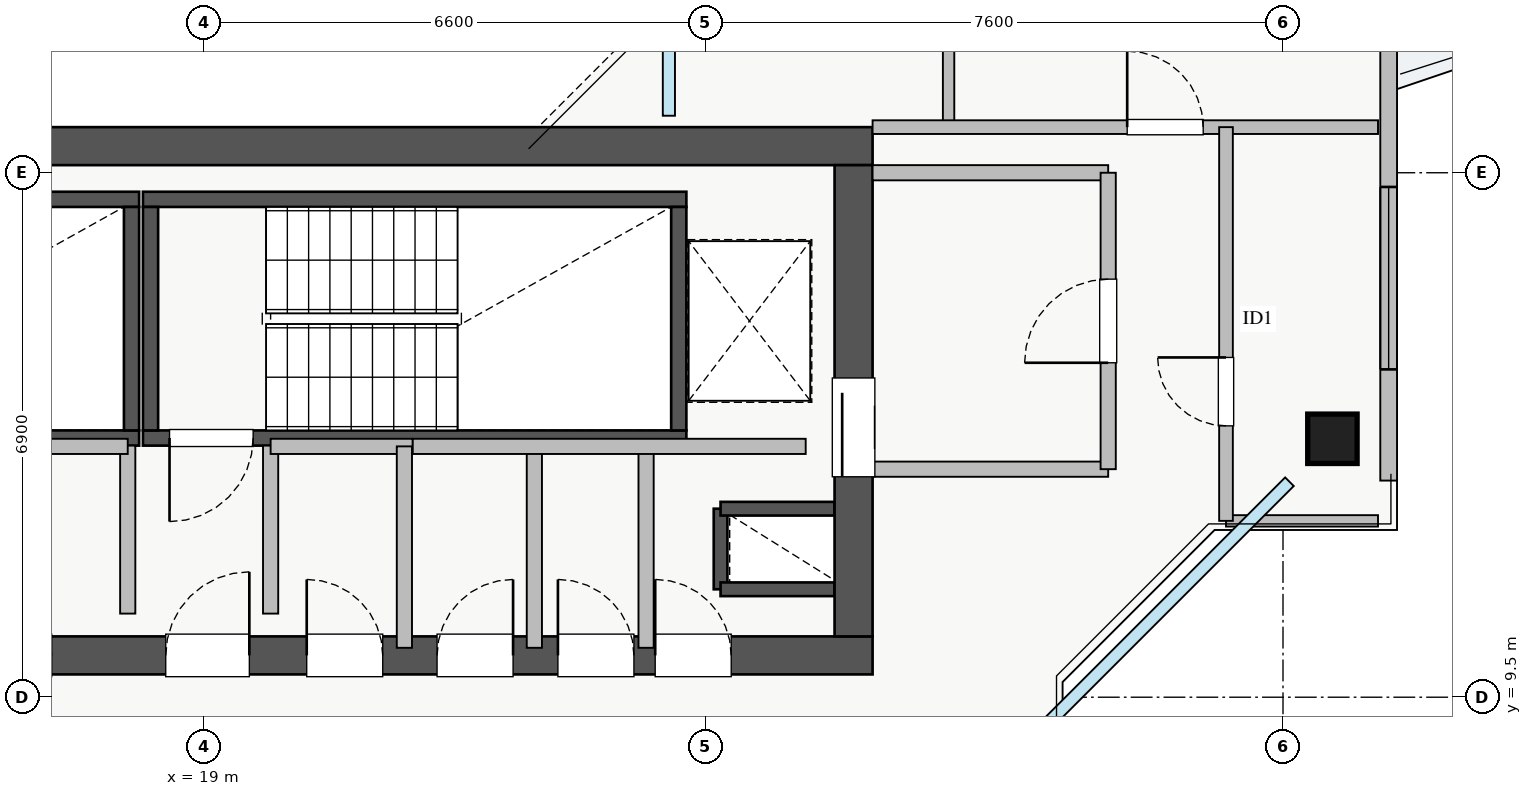
"""IFC4 building model, lengths in metres.
Left out: names, types, materials, properties, quantities, classifications, styles, units other than length and angle.
Written with IfcOpenShell. Run it as: python <this file> out.ifc"""

import sys

from ifc_helpers import new_model, si_unit, direction, frame, frame_2d, origin, origin_2d, place, context, subcontext, project, spatial, rectangle, extrude, source, transform, mapped, element, fill, save


model = new_model("IFC4")
c1 = context("Model", 3, precision=1e-05, world=origin(), true_north=direction((0.0, 1.0)))
c2 = subcontext(c1, "Body", "Model", "MODEL_VIEW")
j1 = project(units=[si_unit("LENGTHUNIT", "METRE"), si_unit("PLANEANGLEUNIT", "RADIAN")], contexts=[c1])
p1 = place(None, origin())
s1 = spatial("IfcSite", under=j1, at=p1, CompositionType="ELEMENT")
p2 = place(p1, origin())
s2 = spatial("IfcBuilding", under=s1, at=p2, CompositionType="ELEMENT")
p3 = place(p2, frame((0.0, 0.0, 243.75)))
s3 = spatial("IfcBuildingStorey", under=s2, at=p3, CompositionType="ELEMENT", Elevation=243.75)
p4 = place(p3, frame((25.8, 10.92, 0.0), z_axis=(0.0, 0.0, 1.0), x_axis=(0.0, 1.0, 0.0)))
e1 = element("IfcWall", 1, at=p4, inside=s3, PredefinedType="SHEAR", context=c2, shape_type="SweptSolid", body=[
    extrude(rectangle(XDim=1.06, YDim=0.18, at=frame_2d((0.53, 0.0))), origin(), (0.0, 0.0, 1.0), 3.07),
])
for number, where, z_axis, x_axis in (
    (2, (25.8, 11.98, 0.0), (0.0, 0.0, 1.0), (1.0, 0.0, 0.0)),
    (3, (25.8, 10.92, 0.0), (0.0, 0.0, 1.0), (1.0, 0.0, 0.0)),
):
    element("IfcWall", number, at=place(p3, frame(where, z_axis=z_axis, x_axis=x_axis)), inside=s3, PredefinedType="SHEAR", context=c2, shape_type="SweptSolid", body=[
        extrude(rectangle(XDim=1.5, YDim=0.18, at=frame_2d((0.75, 0.0))), origin(), (0.0, 0.0, 1.0), 3.07),
    ])
p5 = place(p3, frame((10.7, 12.91, 0.0), z_axis=(0.0, 0.0, 1.0), x_axis=(1.0, 0.0, 0.0)))
e4 = element("IfcWall", 4, at=p5, inside=s3, PredefinedType="SHEAR", context=c2, shape_type="SweptSolid", body=[
    extrude(rectangle(XDim=7.45, YDim=0.2, at=frame_2d((3.725, 0.0))), origin(), (0.0, 0.0, 1.0), 3.25),
])
p6 = place(p5, frame((0.35, 0.0, 0.0)))
e5 = element("IfcOpeningElement", 5, at=p6, cuts=e4, PredefinedType="OPENING", context=c2, shape_type="SweptSolid", body=[
    extrude(rectangle(XDim=1.1, YDim=2.05, at=frame_2d((0.55, 1.025))), frame((0.0, 0.11, 0.0), z_axis=(0.0, -1.0, 0.0), x_axis=(1.0, 0.0, 0.0)), (0.0, 0.0, 1.0), 0.22),
])
p7 = place(p3, frame((10.7, 16.05, 0.0), z_axis=(0.0, 0.0, 1.0), x_axis=(1.0, 0.0, 0.0)))
e6 = element("IfcWall", 6, at=p7, inside=s3, PredefinedType="SHEAR", context=c2, shape_type="SweptSolid", body=[
    extrude(rectangle(XDim=7.45, YDim=0.2, at=frame_2d((3.725, 0.0))), origin(), (0.0, 0.0, 1.0), 3.25),
])
p8 = place(p3, frame((18.05, 13.01, 0.0), z_axis=(0.0, 0.0, 1.0), x_axis=(0.0, 1.0, 0.0)))
e7 = element("IfcWall", 7, at=p8, inside=s3, PredefinedType="SHEAR", context=c2, shape_type="SweptSolid", body=[
    extrude(rectangle(XDim=2.94, YDim=0.2, at=frame_2d((1.47, 0.0))), origin(), (0.0, 0.0, 1.0), 3.25),
])
p9 = place(p3, frame((18.2, 12.91, 0.0), z_axis=(0.0, 0.0, 1.0), x_axis=(1.0, 0.0, 0.0)))
e8 = element("IfcWall", 8, at=p9, inside=s3, PredefinedType="SHEAR", context=c2, shape_type="SweptSolid", body=[
    extrude(rectangle(XDim=7.15, YDim=0.2, at=frame_2d((3.575, 0.0))), origin(), (0.0, 0.0, 1.0), 3.25),
])
p10 = place(p9, frame((0.35, 0.0, 0.0)))
e9 = element("IfcOpeningElement", 9, at=p10, cuts=e8, PredefinedType="OPENING", context=c2, shape_type="SweptSolid", body=[
    extrude(rectangle(XDim=1.1, YDim=2.05, at=frame_2d((0.55, 1.025))), frame((0.0, 0.11, 0.0), z_axis=(0.0, -1.0, 0.0), x_axis=(1.0, 0.0, 0.0)), (0.0, 0.0, 1.0), 0.22),
])
p11 = place(p3, frame((18.2, 16.05, 0.0), z_axis=(0.0, 0.0, 1.0), x_axis=(1.0, 0.0, 0.0)))
e10 = element("IfcWall", 10, at=p11, inside=s3, PredefinedType="SHEAR", context=c2, shape_type="SweptSolid", body=[
    extrude(rectangle(XDim=7.15, YDim=0.2, at=frame_2d((3.575, 0.0))), origin(), (0.0, 0.0, 1.0), 3.25),
])
for number, where, z_axis, x_axis in (
    (11, (18.3, 13.01, 0.0), (0.0, 0.0, 1.0), (0.0, 1.0, 0.0)),
    (12, (25.25, 13.01, 0.0), (0.0, 0.0, 1.0), (0.0, 1.0, 0.0)),
):
    element("IfcWall", number, at=place(p3, frame(where, z_axis=z_axis, x_axis=x_axis)), inside=s3, PredefinedType="SHEAR", context=c2, shape_type="SweptSolid", body=[
        extrude(rectangle(XDim=2.94, YDim=0.2, at=frame_2d((1.47, 0.0))), origin(), (0.0, 0.0, 1.0), 3.25),
    ])
p12 = place(p3, frame((10.2, 10.05, 0.0), z_axis=(0.0, 0.0, 1.0), x_axis=(1.0, 0.0, 0.0)))
e13 = element("IfcWall", 13, at=p12, inside=s3, PredefinedType="SHEAR", context=c2, shape_type="SweptSolid", body=[
    extrude(rectangle(XDim=17.6, YDim=0.5, at=frame_2d((8.8, 0.0))), origin(), (0.0, 0.0, 1.0), 3.25),
])
p13 = place(p12, frame((1.15, 0.0, 0.0)))
e14 = element("IfcOpeningElement", 14, at=p13, cuts=e13, PredefinedType="OPENING", context=c2, shape_type="SweptSolid", body=[
    extrude(rectangle(XDim=1.1, YDim=2.05, at=frame_2d((0.55, 1.025))), frame((0.0, 0.26, 0.0), z_axis=(0.0, -1.0, 0.0), x_axis=(1.0, 0.0, 0.0)), (0.0, 0.0, 1.0), 0.52),
])
p14 = place(p12, frame((8.3, 0.0, 0.0)))
e15 = element("IfcOpeningElement", 15, at=p14, cuts=e13, PredefinedType="OPENING", context=c2, shape_type="SweptSolid", body=[
    extrude(rectangle(XDim=1.1, YDim=2.05, at=frame_2d((0.55, 1.025))), frame((0.0, 0.26, 0.0), z_axis=(0.0, -1.0, 0.0), x_axis=(1.0, 0.0, 0.0)), (0.0, 0.0, 1.0), 0.52),
])
p15 = place(p12, frame((2.85, 0.0, 0.0)))
e16 = element("IfcOpeningElement", 16, at=p15, cuts=e13, PredefinedType="OPENING", context=c2, shape_type="SweptSolid", body=[
    extrude(rectangle(XDim=1.1, YDim=2.05, at=frame_2d((0.55, 1.025))), frame((0.0, 0.26, 0.0), z_axis=(0.0, -1.0, 0.0), x_axis=(1.0, 0.0, 0.0)), (0.0, 0.0, 1.0), 0.52),
])
p16 = place(p12, frame((5.8, 0.0, 0.0)))
e17 = element("IfcOpeningElement", 17, at=p16, cuts=e13, PredefinedType="OPENING", context=c2, shape_type="SweptSolid", body=[
    extrude(rectangle(XDim=1.0, YDim=2.05, at=frame_2d((0.5, 1.025))), frame((0.0, 0.26, 0.0), z_axis=(0.0, -1.0, 0.0), x_axis=(1.0, 0.0, 0.0)), (0.0, 0.0, 1.0), 0.52),
])
p17 = place(p12, frame((14.74, 0.0, 0.0)))
e18 = element("IfcOpeningElement", 18, at=p17, cuts=e13, PredefinedType="OPENING", context=c2, shape_type="SweptSolid", body=[
    extrude(rectangle(XDim=1.0, YDim=2.05, at=frame_2d((0.5, 1.025))), frame((0.0, 0.26, 0.0), z_axis=(0.0, -1.0, 0.0), x_axis=(1.0, 0.0, 0.0)), (0.0, 0.0, 1.0), 0.52),
])
p18 = place(p12, frame((10.155, 0.0, 0.0)))
e19 = element("IfcOpeningElement", 19, at=p18, cuts=e13, PredefinedType="OPENING", context=c2, shape_type="SweptSolid", body=[
    extrude(rectangle(XDim=1.0, YDim=2.05, at=frame_2d((0.5, 1.025))), frame((0.0, 0.26, 0.0), z_axis=(0.0, -1.0, 0.0), x_axis=(1.0, 0.0, 0.0)), (0.0, 0.0, 1.0), 0.52),
])
p19 = place(p12, frame((11.87, 0.0, 0.0)))
e20 = element("IfcOpeningElement", 20, at=p19, cuts=e13, PredefinedType="OPENING", context=c2, shape_type="SweptSolid", body=[
    extrude(rectangle(XDim=1.0, YDim=2.05, at=frame_2d((0.5, 1.025))), frame((0.0, 0.26, 0.0), z_axis=(0.0, -1.0, 0.0), x_axis=(1.0, 0.0, 0.0)), (0.0, 0.0, 1.0), 0.52),
])
p20 = place(p12, frame((13.46, 0.0, 0.0)))
e21 = element("IfcOpeningElement", 21, at=p20, cuts=e13, PredefinedType="OPENING", context=c2, shape_type="SweptSolid", body=[
    extrude(rectangle(XDim=1.0, YDim=2.05, at=frame_2d((0.5, 1.025))), frame((0.0, 0.26, 0.0), z_axis=(0.0, -1.0, 0.0), x_axis=(1.0, 0.0, 0.0)), (0.0, 0.0, 1.0), 0.52),
])
p21 = place(p3, frame((10.2, 16.75, 0.0), z_axis=(0.0, 0.0, 1.0), x_axis=(1.0, 0.0, 0.0)))
e22 = element("IfcWall", 22, at=p21, inside=s3, PredefinedType="SHEAR", context=c2, shape_type="SweptSolid", body=[
    extrude(rectangle(XDim=17.6, YDim=0.5, at=frame_2d((8.8, 0.0))), origin(), (0.0, 0.0, 1.0), 3.25),
])
p22 = place(p3, frame((27.55, 10.3, 0.0), z_axis=(0.0, 0.0, 1.0), x_axis=(0.0, 1.0, 0.0)))
e23 = element("IfcWall", 23, at=p22, inside=s3, PredefinedType="SHEAR", context=c2, shape_type="SweptSolid", body=[
    extrude(rectangle(XDim=6.2, YDim=0.5, at=frame_2d((3.1, 0.0))), origin(), (0.0, 0.0, 1.0), 3.25),
])
p23 = place(p22, frame((2.1, 0.0, 0.0)))
e24 = element("IfcOpeningElement", 24, at=p23, cuts=e23, PredefinedType="OPENING", context=c2, shape_type="SweptSolid", body=[
    extrude(rectangle(XDim=1.3, YDim=2.05, at=frame_2d((0.65, 1.025))), frame((0.0, 0.26, 0.0), z_axis=(0.0, -1.0, 0.0), x_axis=(1.0, 0.0, 0.0)), (0.0, 0.0, 1.0), 0.52),
])
m1 = source(origin(), c2, "Body", "SweptSolid", [
    extrude(rectangle(XDim=0.65, YDim=0.65, at=origin_2d()), origin(), (0.0, 0.0, 1.0), 3.25),
])
p24 = place(p3, frame((33.85, 12.9, 0.0), z_axis=(0.0, 0.0, 1.0), x_axis=(1.0, 0.0, 0.0)))
e25 = element("IfcColumn", 25, at=p24, inside=s3, PredefinedType="COLUMN", context=c2, shape_type="MappedRepresentation", body=[
    mapped(m1, transform((0.0, 0.0, 0.0), x_axis=(1.0, 0.0, 0.0), y_axis=(0.0, 1.0, 0.0), z_axis=(0.0, 0.0, 1.0), scale=1.0)),
])
p25 = place(p3, frame((34.59, 12.35, 0.0), z_axis=(0.0, 0.0, 1.0), x_axis=(0.0, 1.0, 0.0)))
e26 = element("IfcWall", 26, at=p25, inside=s3, PredefinedType="STANDARD", context=c2, shape_type="SweptSolid", body=[
    extrude(rectangle(XDim=21.3, YDim=0.22, at=frame_2d((10.65, 0.0))), origin(), (0.0, 0.0, 1.0), 2.61),
])
p26 = place(p25, frame((11.5, 0.0, 0.0)))
e27 = element("IfcOpeningElement", 27, at=p26, cuts=e26, PredefinedType="OPENING", context=c2, shape_type="SweptSolid", body=[
    extrude(rectangle(XDim=1.2, YDim=2.1, at=frame_2d((0.6, 1.05))), frame((0.0, 0.12, 0.0), z_axis=(0.0, -1.0, 0.0), x_axis=(1.0, 0.0, 0.0)), (0.0, 0.0, 1.0), 0.24),
])
p27 = place(p25, frame((1.463, 0.0, 0.9)))
e28 = element("IfcOpeningElement", 28, at=p27, cuts=e26, PredefinedType="OPENING", context=c2, shape_type="SweptSolid", body=[
    extrude(rectangle(XDim=2.4, YDim=1.48, at=frame_2d((1.2, 0.74))), frame((0.0, 0.12, 0.0), z_axis=(0.0, -1.0, 0.0), x_axis=(1.0, 0.0, 0.0)), (0.0, 0.0, 1.0), 0.24),
])
p28 = place(p25, frame((17.588, 0.0, 0.9)))
e29 = element("IfcOpeningElement", 29, at=p28, cuts=e26, PredefinedType="OPENING", context=c2, shape_type="SweptSolid", body=[
    extrude(rectangle(XDim=2.1, YDim=1.48, at=frame_2d((1.05, 0.74))), frame((0.0, 0.12, 0.0), z_axis=(0.0, -1.0, 0.0), x_axis=(1.0, 0.0, 0.0)), (0.0, 0.0, 1.0), 0.24),
])
for number, where, z_axis, x_axis in (
    (30, (27.8, 16.4, 0.0), (0.0, 0.0, 1.0), (1.0, 0.0, 0.0)),
    (31, (27.8, 12.5, 0.0), (0.0, 0.0, 1.0), (1.0, 0.0, 0.0)),
):
    element("IfcWall", number, at=place(p3, frame(where, z_axis=z_axis, x_axis=x_axis)), inside=s3, PredefinedType="PARTITIONING", context=c2, shape_type="SweptSolid", body=[
        extrude(rectangle(XDim=3.1, YDim=0.2, at=frame_2d((1.55, 0.0))), origin(), (0.0, 0.0, 1.0), 3.07),
    ])
p29 = place(p3, frame((30.9, 12.5, 0.0), z_axis=(0.0, 0.0, 1.0), x_axis=(0.0, 1.0, 0.0)))
e32 = element("IfcWall", 32, at=p29, inside=s3, PredefinedType="PARTITIONING", context=c2, shape_type="SweptSolid", body=[
    extrude(rectangle(XDim=3.9, YDim=0.2, at=frame_2d((1.95, 0.0))), origin(), (0.0, 0.0, 1.0), 2.865),
])
p30 = place(p29, frame((1.4, 0.0, 0.0)))
e33 = element("IfcOpeningElement", 33, at=p30, cuts=e32, PredefinedType="OPENING", context=c2, shape_type="SweptSolid", body=[
    extrude(rectangle(XDim=1.1, YDim=2.05, at=frame_2d((0.55, 1.025))), frame((0.0, 0.11, 0.0), z_axis=(0.0, -1.0, 0.0), x_axis=(1.0, 0.0, 0.0)), (0.0, 0.0, 1.0), 0.22),
])
for number, where, z_axis, x_axis in (
    (34, (18.0, 10.6, 0.0), (0.0, 0.0, 1.0), (0.0, 1.0, 0.0)),
    (35, (19.88, 10.6, 0.0), (0.0, 0.0, 1.0), (0.0, 1.0, 0.0)),
):
    element("IfcWall", number, at=place(p3, frame(where, z_axis=z_axis, x_axis=x_axis)), inside=s3, PredefinedType="PARTITIONING", context=c2, shape_type="SweptSolid", body=[
        extrude(rectangle(XDim=2.21, YDim=0.2, at=frame_2d((1.105, 0.0))), origin(), (0.0, 0.0, 1.0), 3.07),
    ])
p31 = place(p3, frame((14.72, 12.8, 0.0), z_axis=(0.0, 0.0, 1.0), x_axis=(1.0, 0.0, 0.0)))
e36 = element("IfcWall", 36, at=p31, inside=s3, PredefinedType="PARTITIONING", context=c2, shape_type="SweptSolid", body=[
    extrude(rectangle(XDim=3.28, YDim=0.2, at=frame_2d((1.64, 0.0))), origin(), (0.0, 0.0, 1.0), 3.07),
])
p32 = place(p3, frame((24.82, 10.15, 0.0), z_axis=(0.0, 0.0, 1.0), x_axis=(0.0, 1.0, 0.0)))
e37 = element("IfcWall", 37, at=p32, inside=s3, PredefinedType="PARTITIONING", context=c2, shape_type="SweptSolid", body=[
    extrude(rectangle(XDim=2.65, YDim=0.2, at=frame_2d((1.325, 0.0))), origin(), (0.0, 0.0, 1.0), 3.07),
])
p33 = place(p3, frame((19.88, 12.8, 0.0), z_axis=(0.0, 0.0, 1.0), x_axis=(1.0, 0.0, 0.0)))
e38 = element("IfcWall", 38, at=p33, inside=s3, PredefinedType="PARTITIONING", context=c2, shape_type="SweptSolid", body=[
    extrude(rectangle(XDim=1.87, YDim=0.2, at=frame_2d((0.935, 0.0))), origin(), (0.0, 0.0, 1.0), 3.07),
])
for number, where, z_axis, x_axis in (
    (39, (21.64, 10.15, 0.0), (0.0, 0.0, 1.0), (0.0, 1.0, 0.0)),
    (40, (23.35, 10.15, 0.0), (0.0, 0.0, 1.0), (0.0, 1.0, 0.0)),
):
    element("IfcWall", number, at=place(p3, frame(where, z_axis=z_axis, x_axis=x_axis)), inside=s3, PredefinedType="PARTITIONING", context=c2, shape_type="SweptSolid", body=[
        extrude(rectangle(XDim=2.65, YDim=0.2, at=frame_2d((1.325, 0.0))), origin(), (0.0, 0.0, 1.0), 3.07),
    ])
p34 = place(p3, frame((21.75, 12.8, 0.0), z_axis=(0.0, 0.0, 1.0), x_axis=(1.0, 0.0, 0.0)))
e41 = element("IfcWall", 41, at=p34, inside=s3, PredefinedType="PARTITIONING", context=c2, shape_type="SweptSolid", body=[
    extrude(rectangle(XDim=5.17, YDim=0.2, at=frame_2d((2.585, 0.0))), origin(), (0.0, 0.0, 1.0), 3.07),
])
p35 = place(p3, frame((28.8, 17.0, 0.0), z_axis=(0.0, 0.0, 1.0), x_axis=(0.0, 1.0, 0.0)))
e42 = element("IfcWall", 42, at=p35, inside=s3, PredefinedType="PARTITIONING", context=c2, shape_type="SweptSolid", body=[
    extrude(rectangle(XDim=6.0, YDim=0.15, at=frame_2d((3.0, 0.0))), origin(), (0.0, 0.0, 1.0), 3.07),
])
p36 = place(p35, frame((2.2, 0.0, 0.0)))
e43 = element("IfcOpeningElement", 43, at=p36, cuts=e42, PredefinedType="OPENING", context=c2, shape_type="SweptSolid", body=[
    extrude(rectangle(XDim=0.9, YDim=2.05, at=frame_2d((0.45, 1.025))), frame((0.0, 0.085, 0.0), z_axis=(0.0, -1.0, 0.0), x_axis=(1.0, 0.0, 0.0)), (0.0, 0.0, 1.0), 0.17),
])
p37 = place(p3, frame((27.8, 17.0, 0.0), z_axis=(0.0, 0.0, 1.0), x_axis=(1.0, 0.0, 0.0)))
e44 = element("IfcWall", 44, at=p37, inside=s3, PredefinedType="PARTITIONING", context=c2, shape_type="SweptSolid", body=[
    extrude(rectangle(XDim=6.65, YDim=0.18, at=frame_2d((3.325, 0.0))), origin(), (0.0, 0.0, 1.0), 3.07),
])
p38 = place(p37, frame((3.35, 0.0, 0.0)))
e45 = element("IfcOpeningElement", 45, at=p38, cuts=e44, PredefinedType="OPENING", context=c2, shape_type="SweptSolid", body=[
    extrude(rectangle(XDim=1.0, YDim=2.05, at=frame_2d((0.5, 1.025))), frame((0.0, 0.1, 0.0), z_axis=(0.0, -1.0, 0.0), x_axis=(1.0, 0.0, 0.0)), (0.0, 0.0, 1.0), 0.2),
])
p39 = place(p3, frame((32.45, 11.82, 0.0), z_axis=(0.0, 0.0, 1.0), x_axis=(1.0, 0.0, 0.0)))
e46 = element("IfcWall", 46, at=p39, inside=s3, PredefinedType="PARTITIONING", context=c2, shape_type="SweptSolid", body=[
    extrude(rectangle(XDim=2.0, YDim=0.15, at=frame_2d((1.0, 0.0))), origin(), (0.0, 0.0, 1.0), 3.07),
])
p40 = place(p3, frame((32.45, 11.82, 0.0), z_axis=(0.0, 0.0, 1.0), x_axis=(0.0, 1.0, 0.0)))
e47 = element("IfcWall", 47, at=p40, inside=s3, PredefinedType="PARTITIONING", context=c2, shape_type="SweptSolid", body=[
    extrude(rectangle(XDim=5.18, YDim=0.18, at=frame_2d((2.59, 0.0))), origin(), (0.0, 0.0, 1.0), 3.07),
])
p41 = place(p40, frame((1.25, 0.0, 0.0)))
e48 = element("IfcOpeningElement", 48, at=p41, cuts=e47, PredefinedType="OPENING", context=c2, shape_type="SweptSolid", body=[
    extrude(rectangle(XDim=0.9, YDim=2.05, at=frame_2d((0.45, 1.025))), frame((0.0, 0.1, 0.0), z_axis=(0.0, -1.0, 0.0), x_axis=(1.0, 0.0, 0.0)), (0.0, 0.0, 1.0), 0.2),
])
m2 = source(origin(), c2, "Body", "SweptSolid", [
    extrude(rectangle(XDim=2.4, YDim=1.48, at=frame_2d((1.2, 0.74))), frame((0.0, 0.03, 0.0), z_axis=(0.0, -1.0, 0.0), x_axis=(1.0, 0.0, 0.0)), (0.0, 0.0, 1.0), 0.06),
])
p42 = place(p27, origin())
e49 = element("IfcWindow", 49, at=p42, inside=s3, PartitioningType="TRIPLE_PANEL_VERTICAL", PredefinedType="WINDOW", context=c2, shape_type="MappedRepresentation", body=[
    mapped(m2, transform((0.0, 0.0, 0.0), x_axis=(1.0, 0.0, 0.0), y_axis=(0.0, 1.0, 0.0), z_axis=(0.0, 0.0, 1.0), scale=1.0)),
])
fill(e28, e49)
m3 = source(origin(), c2, "Body", "SweptSolid", [
    extrude(rectangle(XDim=1.3, YDim=2.05, at=frame_2d((0.65, 1.025))), frame((0.0, 0.025, 0.0), z_axis=(0.0, -1.0, 0.0), x_axis=(1.0, 0.0, 0.0)), (0.0, 0.0, 1.0), 0.05),
])
p43 = place(p23, origin())
e50 = element("IfcDoor", 50, at=p43, inside=s3, OperationType="SLIDING_TO_RIGHT", PredefinedType="DOOR", context=c2, shape_type="MappedRepresentation", body=[
    mapped(m3, transform((0.0, 0.0, 0.0), x_axis=(1.0, 0.0, 0.0), y_axis=(0.0, 1.0, 0.0), z_axis=(0.0, 0.0, 1.0), scale=1.0)),
])
fill(e24, e50)
m4 = source(origin(), c2, "Body", "SweptSolid", [
    extrude(rectangle(XDim=1.1, YDim=2.05, at=frame_2d((0.55, 1.025))), frame((0.0, 0.025, 0.0), z_axis=(0.0, -1.0, 0.0), x_axis=(1.0, 0.0, 0.0)), (0.0, 0.0, 1.0), 0.05),
])
p44 = place(p14, origin())
e51 = element("IfcDoor", 51, at=p44, inside=s3, OperationType="SINGLE_SWING_RIGHT", PredefinedType="DOOR", context=c2, shape_type="MappedRepresentation", body=[
    mapped(m4, transform((0.0, 0.0, 0.0), x_axis=(1.0, 0.0, 0.0), y_axis=(0.0, 1.0, 0.0), z_axis=(0.0, 0.0, 1.0), scale=1.0)),
])
fill(e15, e51)
p45 = place(p10, frame((1.1, 0.0, 0.0), z_axis=(0.0, 0.0, 1.0), x_axis=(-1.0, 0.0, 0.0)))
e52 = element("IfcDoor", 52, at=p45, inside=s3, OperationType="SINGLE_SWING_LEFT", PredefinedType="DOOR", context=c2, shape_type="MappedRepresentation", body=[
    mapped(m4, transform((0.0, 0.0, 0.0), x_axis=(1.0, 0.0, 0.0), y_axis=(0.0, 1.0, 0.0), z_axis=(0.0, 0.0, 1.0), scale=1.0)),
])
fill(e9, e52)
m5 = source(origin(), c2, "Body", "SweptSolid", [
    extrude(rectangle(XDim=1.0, YDim=2.05, at=frame_2d((0.5, 1.025))), frame((0.0, 0.025, 0.0), z_axis=(0.0, -1.0, 0.0), x_axis=(1.0, 0.0, 0.0)), (0.0, 0.0, 1.0), 0.05),
])
p46 = place(p17, origin())
e53 = element("IfcDoor", 53, at=p46, inside=s3, OperationType="SINGLE_SWING_LEFT", PredefinedType="DOOR", context=c2, shape_type="MappedRepresentation", body=[
    mapped(m5, transform((0.0, 0.0, 0.0), x_axis=(1.0, 0.0, 0.0), y_axis=(0.0, 1.0, 0.0), z_axis=(0.0, 0.0, 1.0), scale=1.0)),
])
fill(e18, e53)
p47 = place(p18, origin())
e54 = element("IfcDoor", 54, at=p47, inside=s3, OperationType="SINGLE_SWING_LEFT", PredefinedType="DOOR", context=c2, shape_type="MappedRepresentation", body=[
    mapped(m5, transform((0.0, 0.0, 0.0), x_axis=(1.0, 0.0, 0.0), y_axis=(0.0, 1.0, 0.0), z_axis=(0.0, 0.0, 1.0), scale=1.0)),
])
fill(e19, e54)
p48 = place(p19, origin())
e55 = element("IfcDoor", 55, at=p48, inside=s3, OperationType="SINGLE_SWING_RIGHT", PredefinedType="DOOR", context=c2, shape_type="MappedRepresentation", body=[
    mapped(m5, transform((0.0, 0.0, 0.0), x_axis=(1.0, 0.0, 0.0), y_axis=(0.0, 1.0, 0.0), z_axis=(0.0, 0.0, 1.0), scale=1.0)),
])
fill(e20, e55)
p49 = place(p20, origin())
e56 = element("IfcDoor", 56, at=p49, inside=s3, OperationType="SINGLE_SWING_LEFT", PredefinedType="DOOR", context=c2, shape_type="MappedRepresentation", body=[
    mapped(m5, transform((0.0, 0.0, 0.0), x_axis=(1.0, 0.0, 0.0), y_axis=(0.0, 1.0, 0.0), z_axis=(0.0, 0.0, 1.0), scale=1.0)),
])
fill(e21, e56)
p50 = place(p30, origin())
e57 = element("IfcDoor", 57, at=p50, inside=s3, OperationType="SINGLE_SWING_LEFT", PredefinedType="DOOR", context=c2, shape_type="MappedRepresentation", body=[
    mapped(m4, transform((0.0, 0.0, 0.0), x_axis=(1.0, 0.0, 0.0), y_axis=(0.0, 1.0, 0.0), z_axis=(0.0, 0.0, 1.0), scale=1.0)),
])
fill(e33, e57)
p51 = place(p38, origin())
e58 = element("IfcDoor", 58, at=p51, inside=s3, OperationType="SINGLE_SWING_LEFT", PredefinedType="DOOR", context=c2, shape_type="MappedRepresentation", body=[
    mapped(m5, transform((0.0, 0.0, 0.0), x_axis=(1.0, 0.0, 0.0), y_axis=(0.0, 1.0, 0.0), z_axis=(0.0, 0.0, 1.0), scale=1.0)),
])
fill(e45, e58)
m6 = source(origin(), c2, "Body", "SweptSolid", [
    extrude(rectangle(XDim=0.9, YDim=2.05, at=frame_2d((0.45, 1.025))), frame((0.0, 0.025, 0.0), z_axis=(0.0, -1.0, 0.0), x_axis=(1.0, 0.0, 0.0)), (0.0, 0.0, 1.0), 0.05),
])
p52 = place(p41, origin())
e59 = element("IfcDoor", 59, at=p52, inside=s3, OperationType="SINGLE_SWING_RIGHT", PredefinedType="DOOR", context=c2, shape_type="MappedRepresentation", body=[
    mapped(m6, transform((0.0, 0.0, 0.0), x_axis=(1.0, 0.0, 0.0), y_axis=(0.0, 1.0, 0.0), z_axis=(0.0, 0.0, 1.0), scale=1.0)),
])
fill(e48, e59)
save(model, sys.argv[1])
